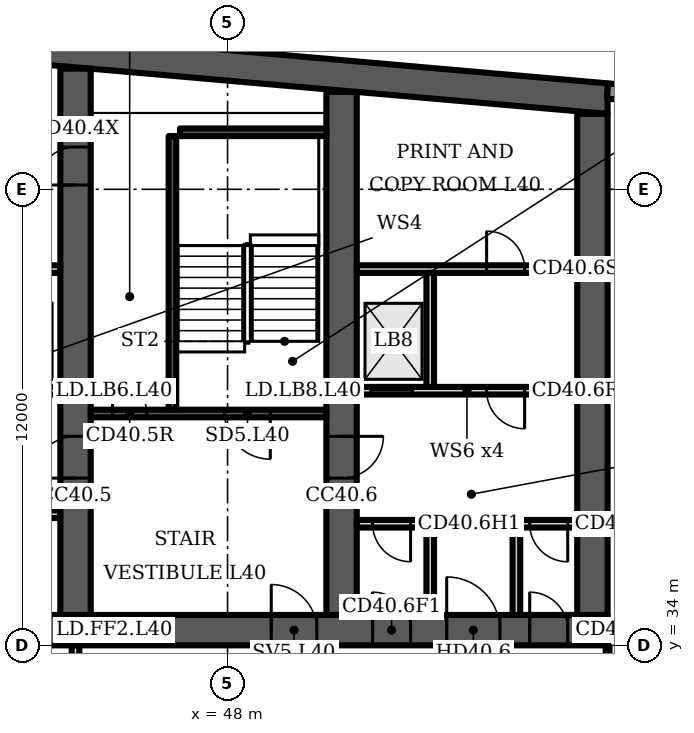
"""IFC4 building model, lengths in metres.
Left out: names, types, materials, properties, quantities, classifications, styles, units other than length and angle.
Written with IfcOpenShell. Run it as: python <this file> out.ifc"""

import sys

from ifc_helpers import new_model, si_unit, direction, frame, frame_2d, origin, place, context, subcontext, project, spatial, polyline, rectangle, outline, extrude, element, fill, save


model = new_model("IFC4")
c1 = context("Model", 3, precision=1e-05, world=origin(), true_north=direction((0.0, 1.0)))
c2 = subcontext(c1, "Body", "Model", "MODEL_VIEW")
j1 = project(units=[si_unit("LENGTHUNIT", "METRE"), si_unit("PLANEANGLEUNIT", "RADIAN")], contexts=[c1])
p1 = place(None, origin())
s1 = spatial("IfcSite", under=j1, at=p1, CompositionType="ELEMENT")
p2 = place(p1, origin())
s2 = spatial("IfcBuilding", under=s1, at=p2, CompositionType="ELEMENT")
p3 = place(p2, frame((0.0, 0.0, 166.3)))
s3 = spatial("IfcBuildingStorey", under=s2, at=p3, CompositionType="ELEMENT", Elevation=166.3)
p4 = place(p3, frame((0.0, 0.0, -0.0)))
e1 = element("IfcWall", 1, at=p4, inside=s3, PredefinedType="SHEAR", context=c2, shape_type="SweptSolid", body=[
    extrude(outline(polyline([(16.0, 47.984), (37.0, 49.822), (58.0, 47.984), (58.0, 48.787), (37.0, 50.625), (16.0, 48.787), (16.0, 47.984)])), origin(), (0.0, 0.0, 1.0), 3.6),
])
p5 = place(p3, frame((16.0, 34.4, 0.0), z_axis=(0.0, 0.0, 1.0), x_axis=(1.0, 0.0, 0.0)))
e2 = element("IfcWall", 2, at=p5, inside=s3, PredefinedType="SHEAR", context=c2, shape_type="SweptSolid", body=[
    extrude(rectangle(XDim=42.0, YDim=0.8, at=frame_2d((21.0, 0.0))), origin(), (0.0, 0.0, 1.0), 3.6),
])
p6 = place(p5, frame((3.2, 0.0, 0.0)))
e3 = element("IfcOpeningElement", 3, at=p6, cuts=e2, PredefinedType="OPENING", context=c2, shape_type="SweptSolid", body=[
    extrude(rectangle(XDim=1.0, YDim=2.1, at=frame_2d((0.5, 1.05))), frame((0.0, 0.41, 0.0), z_axis=(0.0, -1.0, 0.0), x_axis=(1.0, 0.0, 0.0)), (0.0, 0.0, 1.0), 0.82),
])
p7 = place(p5, frame((7.65, 0.0, 0.0)))
e4 = element("IfcOpeningElement", 4, at=p7, cuts=e2, PredefinedType="OPENING", context=c2, shape_type="SweptSolid", body=[
    extrude(rectangle(XDim=1.2, YDim=2.1, at=frame_2d((0.6, 1.05))), frame((0.0, 0.41, 0.0), z_axis=(0.0, -1.0, 0.0), x_axis=(1.0, 0.0, 0.0)), (0.0, 0.0, 1.0), 0.82),
])
p8 = place(p5, frame((14.767, 0.0, 0.0)))
e5 = element("IfcOpeningElement", 5, at=p8, cuts=e2, PredefinedType="OPENING", context=c2, shape_type="SweptSolid", body=[
    extrude(rectangle(XDim=1.1, YDim=2.1, at=frame_2d((0.55, 1.05))), frame((0.0, 0.41, 0.0), z_axis=(0.0, -1.0, 0.0), x_axis=(1.0, 0.0, 0.0)), (0.0, 0.0, 1.0), 0.82),
])
p9 = place(p5, frame((19.133, 0.0, 0.0)))
e6 = element("IfcOpeningElement", 6, at=p9, cuts=e2, PredefinedType="OPENING", context=c2, shape_type="SweptSolid", body=[
    extrude(rectangle(XDim=1.1, YDim=2.1, at=frame_2d((0.55, 1.05))), frame((0.0, 0.41, 0.0), z_axis=(0.0, -1.0, 0.0), x_axis=(1.0, 0.0, 0.0)), (0.0, 0.0, 1.0), 0.82),
])
p10 = place(p5, frame((16.8, 0.0, 0.0)))
e7 = element("IfcOpeningElement", 7, at=p10, cuts=e2, PredefinedType="OPENING", context=c2, shape_type="SweptSolid", body=[
    extrude(rectangle(XDim=1.4, YDim=2.1, at=frame_2d((0.7, 1.05))), frame((0.0, 0.41, 0.0), z_axis=(0.0, -1.0, 0.0), x_axis=(1.0, 0.0, 0.0)), (0.0, 0.0, 1.0), 0.82),
])
p11 = place(p5, frame((21.767, 0.0, 0.0)))
e8 = element("IfcOpeningElement", 8, at=p11, cuts=e2, PredefinedType="OPENING", context=c2, shape_type="SweptSolid", body=[
    extrude(rectangle(XDim=1.1, YDim=2.1, at=frame_2d((0.55, 1.05))), frame((0.0, 0.41, 0.0), z_axis=(0.0, -1.0, 0.0), x_axis=(1.0, 0.0, 0.0)), (0.0, 0.0, 1.0), 0.82),
])
p12 = place(p5, frame((23.95, 0.0, 0.0)))
e9 = element("IfcOpeningElement", 9, at=p12, cuts=e2, PredefinedType="OPENING", context=c2, shape_type="SweptSolid", body=[
    extrude(rectangle(XDim=1.1, YDim=2.1, at=frame_2d((0.55, 1.05))), frame((0.0, 0.41, 0.0), z_axis=(0.0, -1.0, 0.0), x_axis=(1.0, 0.0, 0.0)), (0.0, 0.0, 1.0), 0.82),
])
p13 = place(p5, frame((26.133, 0.0, 0.0)))
e10 = element("IfcOpeningElement", 10, at=p13, cuts=e2, PredefinedType="OPENING", context=c2, shape_type="SweptSolid", body=[
    extrude(rectangle(XDim=1.1, YDim=2.1, at=frame_2d((0.55, 1.05))), frame((0.0, 0.41, 0.0), z_axis=(0.0, -1.0, 0.0), x_axis=(1.0, 0.0, 0.0)), (0.0, 0.0, 1.0), 0.82),
])
p14 = place(p5, frame((33.15, 0.0, 0.0)))
e11 = element("IfcOpeningElement", 11, at=p14, cuts=e2, PredefinedType="OPENING", context=c2, shape_type="SweptSolid", body=[
    extrude(rectangle(XDim=1.2, YDim=2.1, at=frame_2d((0.6, 1.05))), frame((0.0, 0.41, 0.0), z_axis=(0.0, -1.0, 0.0), x_axis=(1.0, 0.0, 0.0)), (0.0, 0.0, 1.0), 0.82),
])
p15 = place(p5, frame((35.817, 0.0, 0.0)))
e12 = element("IfcOpeningElement", 12, at=p15, cuts=e2, PredefinedType="OPENING", context=c2, shape_type="SweptSolid", body=[
    extrude(rectangle(XDim=1.0, YDim=2.1, at=frame_2d((0.5, 1.05))), frame((0.0, 0.41, 0.0), z_axis=(0.0, -1.0, 0.0), x_axis=(1.0, 0.0, 0.0)), (0.0, 0.0, 1.0), 0.82),
])
p16 = place(p5, frame((39.95, 0.0, 0.0)))
e13 = element("IfcOpeningElement", 13, at=p16, cuts=e2, PredefinedType="OPENING", context=c2, shape_type="SweptSolid", body=[
    extrude(rectangle(XDim=1.0, YDim=2.1, at=frame_2d((0.5, 1.05))), frame((0.0, 0.41, 0.0), z_axis=(0.0, -1.0, 0.0), x_axis=(1.0, 0.0, 0.0)), (0.0, 0.0, 1.0), 0.82),
])
p17 = place(p5, frame((37.767, 0.0, 0.0)))
e14 = element("IfcOpeningElement", 14, at=p17, cuts=e2, PredefinedType="OPENING", context=c2, shape_type="SweptSolid", body=[
    extrude(rectangle(XDim=1.4, YDim=2.1, at=frame_2d((0.7, 1.05))), frame((0.0, 0.41, 0.0), z_axis=(0.0, -1.0, 0.0), x_axis=(1.0, 0.0, 0.0)), (0.0, 0.0, 1.0), 0.82),
])
p18 = place(p3, frame((44.0, 34.8, 0.0), z_axis=(0.0, 0.0, 1.0), x_axis=(0.0, 1.0, 0.0)))
e15 = element("IfcWall", 15, at=p18, inside=s3, PredefinedType="SHEAR", context=c2, shape_type="SweptSolid", body=[
    extrude(rectangle(XDim=14.374, YDim=0.8, at=frame_2d((7.187, 0.0))), origin(), (0.0, 0.0, 1.0), 3.6),
])
p19 = place(p18, frame((11.312, 0.0, 0.0)))
e16 = element("IfcOpeningElement", 16, at=p19, cuts=e15, PredefinedType="OPENING", context=c2, shape_type="SweptSolid", body=[
    extrude(rectangle(XDim=1.0, YDim=2.1, at=frame_2d((0.5, 1.05))), frame((0.0, 0.41, 0.0), z_axis=(0.0, -1.0, 0.0), x_axis=(1.0, 0.0, 0.0)), (0.0, 0.0, 1.0), 0.82),
])
p20 = place(p18, frame((3.6, 0.0, 0.0)))
e17 = element("IfcOpeningElement", 17, at=p20, cuts=e15, PredefinedType="OPENING", context=c2, shape_type="SweptSolid", body=[
    extrude(rectangle(XDim=1.1, YDim=2.1, at=frame_2d((0.55, 1.05))), frame((0.0, 0.41, 0.0), z_axis=(0.0, -1.0, 0.0), x_axis=(1.0, 0.0, 0.0)), (0.0, 0.0, 1.0), 0.82),
])
p21 = place(p3, frame((51.0, 34.8, 0.0), z_axis=(0.0, 0.0, 1.0), x_axis=(0.0, 1.0, 0.0)))
e18 = element("IfcWall", 18, at=p21, inside=s3, PredefinedType="SHEAR", context=c2, shape_type="SweptSolid", body=[
    extrude(rectangle(XDim=13.762, YDim=0.8, at=frame_2d((6.881, 0.0))), origin(), (0.0, 0.0, 1.0), 3.6),
])
p22 = place(p21, frame((3.6, 0.0, 0.0)))
e19 = element("IfcOpeningElement", 19, at=p22, cuts=e18, PredefinedType="OPENING", context=c2, shape_type="SweptSolid", body=[
    extrude(rectangle(XDim=1.1, YDim=2.1, at=frame_2d((0.55, 1.05))), frame((0.0, 0.41, 0.0), z_axis=(0.0, -1.0, 0.0), x_axis=(1.0, 0.0, 0.0)), (0.0, 0.0, 1.0), 0.82),
])
p23 = place(p3, frame((57.6, 34.8, 0.0), z_axis=(0.0, 0.0, 1.0), x_axis=(0.0, 1.0, 0.0)))
e20 = element("IfcWall", 20, at=p23, inside=s3, PredefinedType="SHEAR", context=c2, shape_type="SweptSolid", body=[
    extrude(rectangle(XDim=13.184, YDim=0.8, at=frame_2d((6.592, 0.0))), origin(), (0.0, 0.0, 1.0), 3.6),
])
p24 = place(p3, frame((60.983, 48.326, 0.0), z_axis=(0.0, 0.0, 1.0), x_axis=(-0.996194, 0.087168, 0.0)))
e21 = element("IfcWall", 21, at=p24, inside=s3, PredefinedType="SOLIDWALL", context=c2, shape_type="SweptSolid", body=[
    extrude(rectangle(XDim=2.994, YDim=0.4, at=frame_2d((1.497, 0.0))), origin(), (0.0, 0.0, 1.0), 3.2),
])
p25 = place(p3, frame((37.4, 40.7, 0.0), z_axis=(0.0, 0.0, 1.0), x_axis=(1.0, 0.0, 0.0)))
e22 = element("IfcWall", 22, at=p25, inside=s3, PredefinedType="PARTITIONING", context=c2, shape_type="SweptSolid", body=[
    extrude(rectangle(XDim=6.2, YDim=0.2, at=frame_2d((3.1, 0.0))), origin(), (0.0, 0.0, 1.0), 3.2),
])
p26 = place(p25, frame((0.367, 0.0, 0.0)))
e23 = element("IfcOpeningElement", 23, at=p26, cuts=e22, PredefinedType="OPENING", context=c2, shape_type="SweptSolid", body=[
    extrude(rectangle(XDim=1.1, YDim=2.1, at=frame_2d((0.55, 1.05))), frame((0.0, 0.11, 0.0), z_axis=(0.0, -1.0, 0.0), x_axis=(1.0, 0.0, 0.0)), (0.0, 0.0, 1.0), 0.22),
])
p27 = place(p25, frame((2.55, 0.0, 0.0)))
e24 = element("IfcOpeningElement", 24, at=p27, cuts=e22, PredefinedType="OPENING", context=c2, shape_type="SweptSolid", body=[
    extrude(rectangle(XDim=1.1, YDim=2.1, at=frame_2d((0.55, 1.05))), frame((0.0, 0.11, 0.0), z_axis=(0.0, -1.0, 0.0), x_axis=(1.0, 0.0, 0.0)), (0.0, 0.0, 1.0), 0.22),
])
p28 = place(p25, frame((4.733, 0.0, 0.0)))
e25 = element("IfcOpeningElement", 25, at=p28, cuts=e22, PredefinedType="OPENING", context=c2, shape_type="SweptSolid", body=[
    extrude(rectangle(XDim=1.1, YDim=2.1, at=frame_2d((0.55, 1.05))), frame((0.0, 0.11, 0.0), z_axis=(0.0, -1.0, 0.0), x_axis=(1.0, 0.0, 0.0)), (0.0, 0.0, 1.0), 0.22),
])
p29 = place(p3, frame((0.0, 0.0, -0.0)))
e26 = element("IfcWall", 26, at=p29, inside=s3, PredefinedType="PARTITIONING", context=c2, shape_type="SweptSolid", body=[
    extrude(outline(polyline([(41.567, 37.1), (39.433, 37.1), (39.433, 34.8), (39.233, 34.8), (39.233, 37.65), (37.4, 37.65), (37.4, 37.85), (39.233, 37.85), (39.433, 37.85), (39.433, 37.3), (41.567, 37.3), (41.567, 37.55), (41.767, 37.55), (43.6, 37.55), (43.6, 37.35), (41.767, 37.35), (41.767, 34.8), (41.567, 34.8), (41.567, 37.1)])), origin(), (0.0, 0.0, 1.0), 3.2),
])
p30 = place(p3, frame((0.0, 0.0, -0.0)))
e27 = element("IfcWall", 27, at=p30, inside=s3, PredefinedType="PARTITIONING", context=c2, shape_type="SweptSolid", body=[
    extrude(outline(polyline([(39.433, 40.8), (39.233, 40.8), (39.233, 43.8), (37.4, 43.8), (37.4, 44.0), (43.6, 44.0), (43.6, 43.8), (41.767, 43.8), (41.767, 40.8), (41.567, 40.8), (41.567, 43.8), (39.433, 43.8), (39.433, 40.8)])), origin(), (0.0, 0.0, 1.0), 3.2),
])
p31 = place(p3, frame((44.4, 40.1, 0.0), z_axis=(0.0, 0.0, 1.0), x_axis=(1.0, 0.0, 0.0)))
e28 = element("IfcWall", 28, at=p31, inside=s3, PredefinedType="SHEAR", context=c2, shape_type="SweptSolid", body=[
    extrude(rectangle(XDim=6.2, YDim=0.2, at=frame_2d((3.1, 0.0))), origin(), (0.0, 0.0, 1.0), 3.2),
])
p32 = place(p31, frame((3.525, 0.0, 0.0)))
e29 = element("IfcOpeningElement", 29, at=p32, cuts=e28, PredefinedType="OPENING", context=c2, shape_type="SweptSolid", body=[
    extrude(rectangle(XDim=1.2, YDim=2.1, at=frame_2d((0.6, 1.05))), frame((0.0, 0.11, 0.0), z_axis=(0.0, -1.0, 0.0), x_axis=(1.0, 0.0, 0.0)), (0.0, 0.0, 1.0), 0.22),
])
p33 = place(p31, frame((0.575, 0.0, 0.0)))
e30 = element("IfcOpeningElement", 30, at=p33, cuts=e28, PredefinedType="OPENING", context=c2, shape_type="SweptSolid", body=[
    extrude(rectangle(XDim=0.9, YDim=2.1, at=frame_2d((0.45, 1.05))), frame((0.0, 0.11, 0.0), z_axis=(0.0, -1.0, 0.0), x_axis=(1.0, 0.0, 0.0)), (0.0, 0.0, 1.0), 0.22),
])
p34 = place(p3, frame((46.55, 40.2, 0.0), z_axis=(0.0, 0.0, 1.0), x_axis=(0.0, 1.0, 0.0)))
e31 = element("IfcWall", 31, at=p34, inside=s3, PredefinedType="SHEAR", context=c2, shape_type="SweptSolid", body=[
    extrude(rectangle(XDim=7.2, YDim=0.2, at=frame_2d((3.6, 0.0))), origin(), (0.0, 0.0, 1.0), 3.2),
])
p35 = place(p3, frame((46.75, 47.5, 0.0), z_axis=(0.0, 0.0, 1.0), x_axis=(1.0, 0.0, 0.0)))
e32 = element("IfcWall", 32, at=p35, inside=s3, PredefinedType="SHEAR", context=c2, shape_type="SweptSolid", body=[
    extrude(rectangle(XDim=3.85, YDim=0.2, at=frame_2d((1.925, 0.0))), origin(), (0.0, 0.0, 1.0), 3.2),
])
p36 = place(p3, frame((51.4, 37.2, 0.0), z_axis=(0.0, 0.0, 1.0), x_axis=(1.0, 0.0, 0.0)))
e33 = element("IfcWall", 33, at=p36, inside=s3, PredefinedType="PARTITIONING", context=c2, shape_type="SweptSolid", body=[
    extrude(rectangle(XDim=1.833, YDim=0.2, at=frame_2d((0.917, 0.0))), origin(), (0.0, 0.0, 1.0), 3.2),
])
p37 = place(p36, frame((0.417, 0.0, 0.0)))
e34 = element("IfcOpeningElement", 34, at=p37, cuts=e33, PredefinedType="OPENING", context=c2, shape_type="SweptSolid", body=[
    extrude(rectangle(XDim=1.0, YDim=2.1, at=frame_2d((0.5, 1.05))), frame((0.0, 0.11, 0.0), z_axis=(0.0, -1.0, 0.0), x_axis=(1.0, 0.0, 0.0)), (0.0, 0.0, 1.0), 0.22),
])
p38 = place(p3, frame((55.7, 37.2, 0.0), z_axis=(0.0, 0.0, 1.0), x_axis=(1.0, 0.0, 0.0)))
e35 = element("IfcWall", 35, at=p38, inside=s3, PredefinedType="PARTITIONING", context=c2, shape_type="SweptSolid", body=[
    extrude(rectangle(XDim=1.5, YDim=0.2, at=frame_2d((0.75, 0.0))), origin(), (0.0, 0.0, 1.0), 3.2),
])
p39 = place(p38, frame((0.25, 0.0, 0.0)))
e36 = element("IfcOpeningElement", 36, at=p39, cuts=e35, PredefinedType="OPENING", context=c2, shape_type="SweptSolid", body=[
    extrude(rectangle(XDim=1.0, YDim=2.1, at=frame_2d((0.5, 1.05))), frame((0.0, 0.11, 0.0), z_axis=(0.0, -1.0, 0.0), x_axis=(1.0, 0.0, 0.0)), (0.0, 0.0, 1.0), 0.22),
])
p40 = place(p3, frame((51.4, 40.7, 0.0), z_axis=(0.0, 0.0, 1.0), x_axis=(1.0, 0.0, 0.0)))
e37 = element("IfcWall", 37, at=p40, inside=s3, PredefinedType="PARTITIONING", context=c2, shape_type="SweptSolid", body=[
    extrude(rectangle(XDim=5.8, YDim=0.2, at=frame_2d((2.9, 0.0))), origin(), (0.0, 0.0, 1.0), 3.2),
])
p41 = place(p40, frame((0.367, 0.0, 0.0)))
e38 = element("IfcOpeningElement", 38, at=p41, cuts=e37, PredefinedType="OPENING", context=c2, shape_type="SweptSolid", body=[
    extrude(rectangle(XDim=1.1, YDim=2.1, at=frame_2d((0.55, 1.05))), frame((0.0, 0.11, 0.0), z_axis=(0.0, -1.0, 0.0), x_axis=(1.0, 0.0, 0.0)), (0.0, 0.0, 1.0), 0.22),
])
p42 = place(p40, frame((3.417, 0.0, 0.0)))
e39 = element("IfcOpeningElement", 39, at=p42, cuts=e37, PredefinedType="OPENING", context=c2, shape_type="SweptSolid", body=[
    extrude(rectangle(XDim=1.0, YDim=2.1, at=frame_2d((0.5, 1.05))), frame((0.0, 0.11, 0.0), z_axis=(0.0, -1.0, 0.0), x_axis=(1.0, 0.0, 0.0)), (0.0, 0.0, 1.0), 0.22),
])
p43 = place(p3, frame((51.4, 43.9, 0.0), z_axis=(0.0, 0.0, 1.0), x_axis=(1.0, 0.0, 0.0)))
e40 = element("IfcWall", 40, at=p43, inside=s3, PredefinedType="PARTITIONING", context=c2, shape_type="SweptSolid", body=[
    extrude(rectangle(XDim=5.8, YDim=0.2, at=frame_2d((2.9, 0.0))), origin(), (0.0, 0.0, 1.0), 3.2),
])
p44 = place(p43, frame((3.417, 0.0, 0.0)))
e41 = element("IfcOpeningElement", 41, at=p44, cuts=e40, PredefinedType="OPENING", context=c2, shape_type="SweptSolid", body=[
    extrude(rectangle(XDim=1.0, YDim=2.1, at=frame_2d((0.5, 1.05))), frame((0.0, 0.11, 0.0), z_axis=(0.0, -1.0, 0.0), x_axis=(1.0, 0.0, 0.0)), (0.0, 0.0, 1.0), 0.22),
])
p45 = place(p3, frame((0.0, 0.0, -0.0)))
e42 = element("IfcWall", 42, at=p45, inside=s3, PredefinedType="PARTITIONING", context=c2, shape_type="SweptSolid", body=[
    extrude(outline(polyline([(53.233, 34.8), (53.233, 37.3), (53.433, 37.3), (53.433, 34.8), (53.233, 34.8)])), origin(), (0.0, 0.0, 1.0), 3.2),
])
p46 = place(p3, frame((0.0, 0.0, -0.0)))
e43 = element("IfcWall", 43, at=p46, inside=s3, PredefinedType="PARTITIONING", context=c2, shape_type="SweptSolid", body=[
    extrude(outline(polyline([(55.5, 34.8), (55.5, 37.3), (55.7, 37.3), (55.7, 34.8), (55.5, 34.8)])), origin(), (0.0, 0.0, 1.0), 3.2),
])
p47 = place(p3, frame((0.0, 0.0, -0.0)))
e44 = element("IfcWall", 44, at=p47, inside=s3, PredefinedType="PARTITIONING", context=c2, shape_type="SweptSolid", body=[
    extrude(outline(polyline([(53.433, 40.8), (53.433, 43.8), (53.233, 43.8), (53.233, 40.8), (53.433, 40.8)])), origin(), (0.0, 0.0, 1.0), 3.2),
])
p48 = place(p3, frame((44.0, 30.5, 0.0), z_axis=(0.0, 0.0, 1.0), x_axis=(0.0, 1.0, 0.0)))
e45 = element("IfcWall", 45, at=p48, inside=s3, PredefinedType="PARTITIONING", context=c2, shape_type="SweptSolid", body=[
    extrude(rectangle(XDim=3.5, YDim=0.2, at=frame_2d((1.75, 0.0))), origin(), (0.0, 0.0, 1.0), 3.2),
])
p49 = place(p48, frame((1.2, 0.0, 0.0)))
e46 = element("IfcOpeningElement", 46, at=p49, cuts=e45, PredefinedType="OPENING", context=c2, shape_type="SweptSolid", body=[
    extrude(rectangle(XDim=1.1, YDim=2.1, at=frame_2d((0.55, 1.05))), frame((0.0, 0.11, 0.0), z_axis=(0.0, -1.0, 0.0), x_axis=(1.0, 0.0, 0.0)), (0.0, 0.0, 1.0), 0.22),
])
p50 = place(p3, frame((58.0, 31.4, 0.0), z_axis=(0.0, 0.0, 1.0), x_axis=(0.0, 1.0, 0.0)))
e47 = element("IfcWall", 47, at=p50, inside=s3, PredefinedType="PARTITIONING", context=c2, shape_type="SweptSolid", body=[
    extrude(rectangle(XDim=2.58, YDim=0.1, at=frame_2d((1.29, 0.0))), origin(), (0.0, 0.0, 1.0), 3.2),
])
p51 = place(p19, origin())
e48 = element("IfcDoor", 48, at=p51, inside=s3, OperationType="SINGLE_SWING_LEFT", PredefinedType="DOOR", context=c2, shape_type="SweptSolid", body=[
    extrude(rectangle(XDim=1.0, YDim=2.1, at=frame_2d((0.5, 1.05))), frame((0.0, 0.4, 0.0), z_axis=(0.0, -1.0, 0.0), x_axis=(1.0, 0.0, 0.0)), (0.0, 0.0, 1.0), 0.8),
])
fill(e16, e48)
p52 = place(p32, origin())
e49 = element("IfcDoor", 49, at=p52, inside=s3, OperationType="SINGLE_SWING_RIGHT", PredefinedType="DOOR", context=c2, shape_type="SweptSolid", body=[
    extrude(rectangle(XDim=1.2, YDim=2.1, at=frame_2d((0.6, 1.05))), frame((0.0, 0.025, 0.0), z_axis=(0.0, -1.0, 0.0), x_axis=(1.0, 0.0, 0.0)), (0.0, 0.0, 1.0), 0.05),
])
fill(e29, e49)
p53 = place(p33, origin())
e50 = element("IfcDoor", 50, at=p53, inside=s3, OperationType="SINGLE_SWING_LEFT", PredefinedType="DOOR", context=c2, shape_type="SweptSolid", body=[
    extrude(rectangle(XDim=0.9, YDim=2.1, at=frame_2d((0.45, 1.05))), frame((0.0, 0.025, 0.0), z_axis=(0.0, -1.0, 0.0), x_axis=(1.0, 0.0, 0.0)), (0.0, 0.0, 1.0), 0.05),
])
fill(e30, e50)
p54 = place(p14, origin())
e51 = element("IfcDoor", 51, at=p54, inside=s3, OperationType="SINGLE_SWING_LEFT", PredefinedType="DOOR", context=c2, shape_type="SweptSolid", body=[
    extrude(rectangle(XDim=1.2, YDim=2.1, at=frame_2d((0.6, 1.05))), frame((0.0, 0.025, 0.0), z_axis=(0.0, -1.0, 0.0), x_axis=(1.0, 0.0, 0.0)), (0.0, 0.0, 1.0), 0.05),
])
fill(e11, e51)
p55 = place(p15, origin())
e52 = element("IfcDoor", 52, at=p55, inside=s3, OperationType="SINGLE_SWING_LEFT", PredefinedType="DOOR", context=c2, shape_type="SweptSolid", body=[
    extrude(rectangle(XDim=1.0, YDim=2.1, at=frame_2d((0.5, 1.05))), frame((0.0, 0.4, 0.0), z_axis=(0.0, -1.0, 0.0), x_axis=(1.0, 0.0, 0.0)), (0.0, 0.0, 1.0), 0.8),
])
fill(e12, e52)
p56 = place(p37, origin())
e53 = element("IfcDoor", 53, at=p56, inside=s3, OperationType="SINGLE_SWING_RIGHT", PredefinedType="DOOR", context=c2, shape_type="SweptSolid", body=[
    extrude(rectangle(XDim=1.0, YDim=2.1, at=frame_2d((0.5, 1.05))), frame((0.0, 0.025, 0.0), z_axis=(0.0, -1.0, 0.0), x_axis=(1.0, 0.0, 0.0)), (0.0, 0.0, 1.0), 0.05),
])
fill(e34, e53)
p57 = place(p16, origin())
e54 = element("IfcDoor", 54, at=p57, inside=s3, OperationType="SINGLE_SWING_LEFT", PredefinedType="DOOR", context=c2, shape_type="SweptSolid", body=[
    extrude(rectangle(XDim=1.0, YDim=2.1, at=frame_2d((0.5, 1.05))), frame((0.0, 0.4, 0.0), z_axis=(0.0, -1.0, 0.0), x_axis=(1.0, 0.0, 0.0)), (0.0, 0.0, 1.0), 0.8),
])
fill(e13, e54)
p58 = place(p39, origin())
e55 = element("IfcDoor", 55, at=p58, inside=s3, OperationType="SINGLE_SWING_RIGHT", PredefinedType="DOOR", context=c2, shape_type="SweptSolid", body=[
    extrude(rectangle(XDim=1.0, YDim=2.1, at=frame_2d((0.5, 1.05))), frame((0.0, 0.025, 0.0), z_axis=(0.0, -1.0, 0.0), x_axis=(1.0, 0.0, 0.0)), (0.0, 0.0, 1.0), 0.05),
])
fill(e36, e55)
p59 = place(p17, origin())
e56 = element("IfcDoor", 56, at=p59, inside=s3, OperationType="DOUBLE_DOOR_SINGLE_SWING", PredefinedType="DOOR", context=c2, shape_type="SweptSolid", body=[
    extrude(rectangle(XDim=1.4, YDim=2.1, at=frame_2d((0.7, 1.05))), frame((0.0, 0.025, 0.0), z_axis=(0.0, -1.0, 0.0), x_axis=(1.0, 0.0, 0.0)), (0.0, 0.0, 1.0), 0.05),
])
fill(e14, e56)
p60 = place(p41, origin())
e57 = element("IfcDoor", 57, at=p60, inside=s3, OperationType="DOUBLE_DOOR_SLIDING", PredefinedType="DOOR", context=c2, shape_type="SweptSolid", body=[
    extrude(rectangle(XDim=1.1, YDim=2.1, at=frame_2d((0.55, 1.05))), frame((0.0, 0.025, 0.0), z_axis=(0.0, -1.0, 0.0), x_axis=(1.0, 0.0, 0.0)), (0.0, 0.0, 1.0), 0.05),
])
fill(e38, e57)
p61 = place(p42, origin())
e58 = element("IfcDoor", 58, at=p61, inside=s3, OperationType="SINGLE_SWING_RIGHT", PredefinedType="DOOR", context=c2, shape_type="SweptSolid", body=[
    extrude(rectangle(XDim=1.0, YDim=2.1, at=frame_2d((0.5, 1.05))), frame((0.0, 0.025, 0.0), z_axis=(0.0, -1.0, 0.0), x_axis=(1.0, 0.0, 0.0)), (0.0, 0.0, 1.0), 0.05),
])
fill(e39, e58)
p62 = place(p44, origin())
e59 = element("IfcDoor", 59, at=p62, inside=s3, OperationType="SINGLE_SWING_LEFT", PredefinedType="DOOR", context=c2, shape_type="SweptSolid", body=[
    extrude(rectangle(XDim=1.0, YDim=2.1, at=frame_2d((0.5, 1.05))), frame((0.0, 0.025, 0.0), z_axis=(0.0, -1.0, 0.0), x_axis=(1.0, 0.0, 0.0)), (0.0, 0.0, 1.0), 0.05),
])
fill(e41, e59)
p63 = place(p20, origin())
e60 = element("IfcDoor", 60, at=p63, inside=s3, OperationType="SINGLE_SWING_LEFT", PredefinedType="DOOR", context=c2, shape_type="SweptSolid", body=[
    extrude(rectangle(XDim=1.1, YDim=2.1, at=frame_2d((0.55, 1.05))), frame((0.0, 0.025, 0.0), z_axis=(0.0, -1.0, 0.0), x_axis=(1.0, 0.0, 0.0)), (0.0, 0.0, 1.0), 0.05),
])
fill(e17, e60)
p64 = place(p22, origin())
e61 = element("IfcDoor", 61, at=p64, inside=s3, OperationType="SINGLE_SWING_RIGHT", PredefinedType="DOOR", context=c2, shape_type="SweptSolid", body=[
    extrude(rectangle(XDim=1.1, YDim=2.1, at=frame_2d((0.55, 1.05))), frame((0.0, 0.025, 0.0), z_axis=(0.0, -1.0, 0.0), x_axis=(1.0, 0.0, 0.0)), (0.0, 0.0, 1.0), 0.05),
])
fill(e19, e61)
save(model, sys.argv[1])
